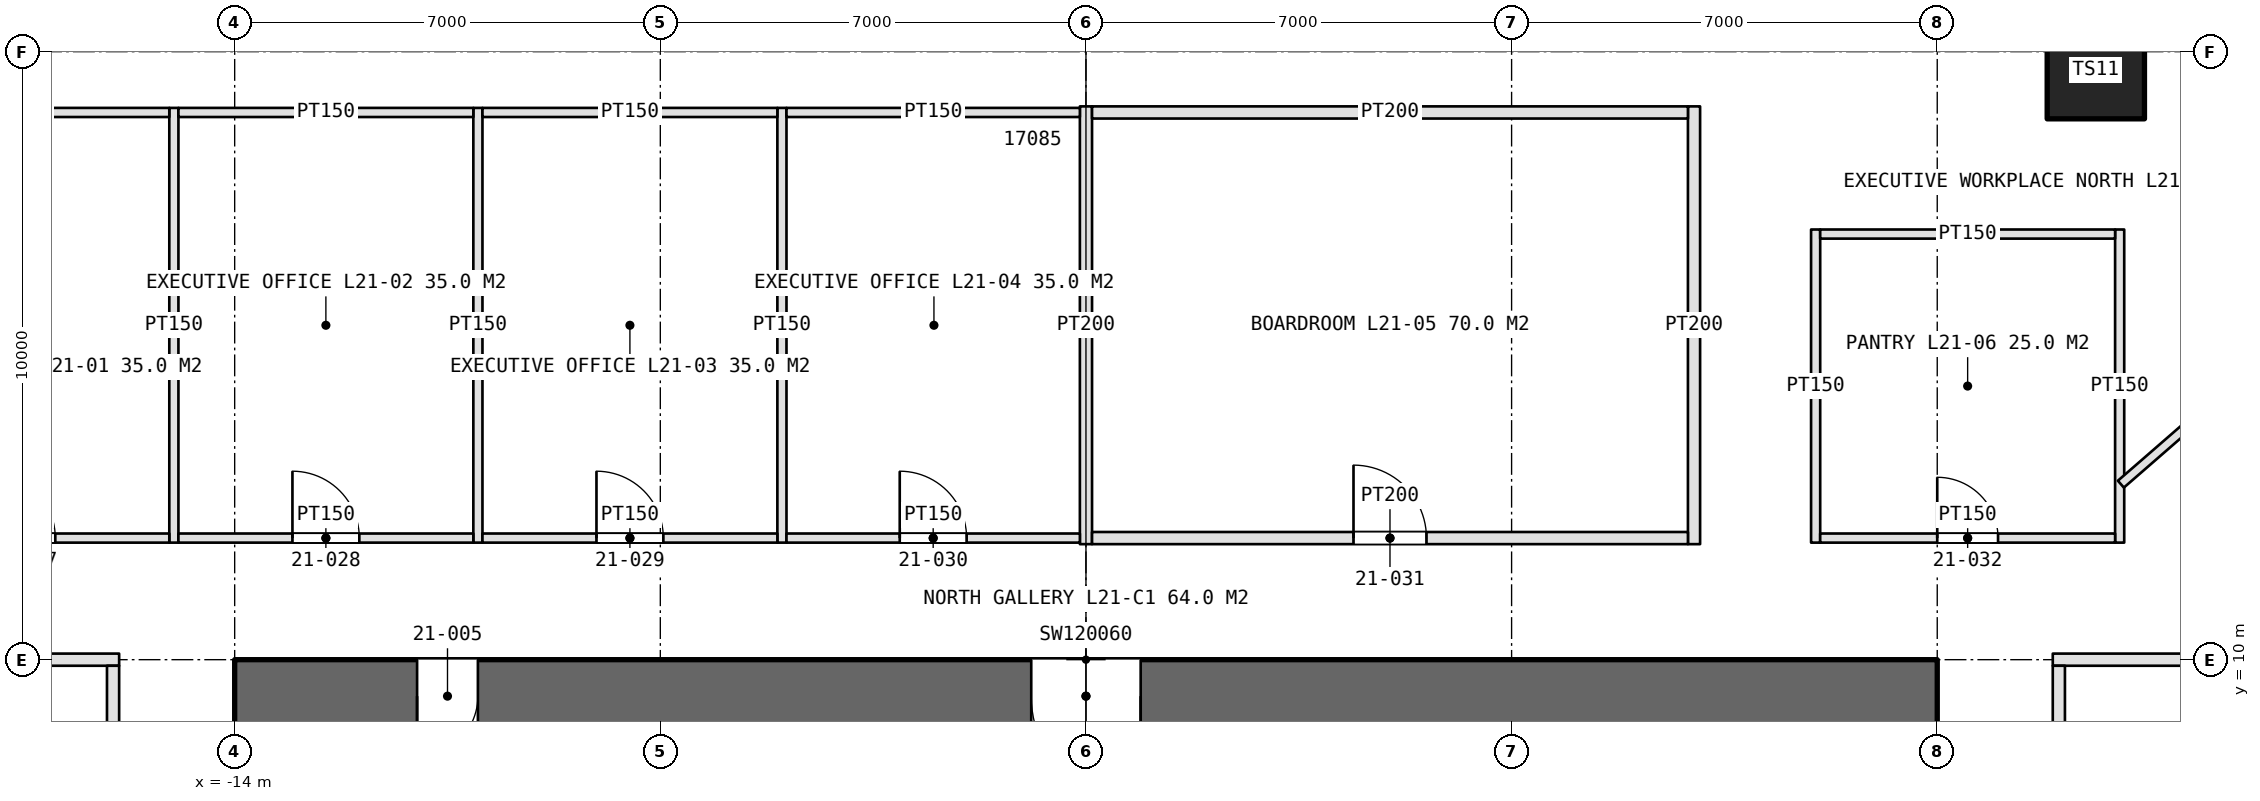
"""IFC4 building model, lengths in metres.
Left out: names, types, materials, properties, quantities, classifications, styles, units other than length and angle.
Written with IfcOpenShell. Run it as: python <this file> out.ifc"""

import sys

from ifc_helpers import new_model, si_unit, direction, frame, frame_2d, origin, origin_2d, place, context, subcontext, project, spatial, rectangle, hollow_rectangle, extrude, element, fill, save


model = new_model("IFC4")
c1 = context("Model", 3, precision=1e-05, world=origin(), true_north=direction((0.0, 1.0)))
c2 = subcontext(c1, "Body", "Model", "MODEL_VIEW")
j1 = project(units=[si_unit("LENGTHUNIT", "METRE"), si_unit("PLANEANGLEUNIT", "RADIAN")], contexts=[c1])
p1 = place(None, origin())
s1 = spatial("IfcSite", under=j1, at=p1, CompositionType="ELEMENT")
p2 = place(p1, origin())
s2 = spatial("IfcBuilding", under=s1, at=p2, CompositionType="ELEMENT")
p3 = place(p2, frame((0.0, 0.0, 105.0)))
s3 = spatial("IfcBuildingStorey", under=s2, at=p3, CompositionType="ELEMENT", Elevation=105.0)
p4 = place(p3, frame((14.0, 9.4, 0.0), z_axis=(0.0, 0.0, 1.0), x_axis=(-1.0, 0.0, 0.0)))
e1 = element("IfcWall", 1, at=p4, inside=s3, PredefinedType="SHEAR", context=c2, shape_type="SweptSolid", body=[
    extrude(rectangle(XDim=28.0, YDim=1.2, at=frame_2d((14.0, 0.0))), origin(), (0.0, 0.0, 1.0), 4.2),
])
p5 = place(p4, frame((24.0, 0.0, 0.0)))
e2 = element("IfcOpeningElement", 2, at=p5, cuts=e1, PredefinedType="OPENING", context=c2, shape_type="SweptSolid", body=[
    extrude(rectangle(XDim=1.0, YDim=2.4, at=frame_2d((0.5, 1.2))), frame((0.0, 0.61, 0.0), z_axis=(0.0, -1.0, 0.0), x_axis=(1.0, 0.0, 0.0)), (0.0, 0.0, 1.0), 1.22),
])
p6 = place(p4, frame((13.1, 0.0, 0.0)))
e3 = element("IfcOpeningElement", 3, at=p6, cuts=e1, PredefinedType="OPENING", context=c2, shape_type="SweptSolid", body=[
    extrude(rectangle(XDim=1.8, YDim=2.4, at=frame_2d((0.9, 1.2))), frame((0.0, 0.61, 0.0), z_axis=(0.0, -1.0, 0.0), x_axis=(1.0, 0.0, 0.0)), (0.0, 0.0, 1.0), 1.22),
])
p7 = place(p3, frame((16.608, 19.695, 0.0), z_axis=(0.0, 0.0, 1.0), x_axis=(1.0, 0.0, 0.0)))
e4 = element("IfcColumn", 4, at=p7, inside=s3, PredefinedType="COLUMN", context=c2, shape_type="SweptSolid", body=[
    extrude(hollow_rectangle(XDim=1.6, YDim=1.6, WallThickness=0.15, at=origin_2d()), origin(), (0.0, 0.0, 1.0), 4.2),
])
for number, where, z_axis, x_axis in (
    (5, (-15.0, 11.925, 0.0), (0.0, 0.0, 1.0), (0.0, 1.0, 0.0)),
    (6, (-10.0, 11.925, 0.0), (0.0, 0.0, 1.0), (0.0, 1.0, 0.0)),
    (7, (-5.0, 11.925, 0.0), (0.0, 0.0, 1.0), (0.0, 1.0, 0.0)),
):
    element("IfcWall", number, at=place(p3, frame(where, z_axis=z_axis, x_axis=x_axis)), inside=s3, PredefinedType="PARTITIONING", context=c2, shape_type="SweptSolid", body=[
        extrude(rectangle(XDim=7.15, YDim=0.15, at=frame_2d((3.575, 0.0))), origin(), (0.0, 0.0, 1.0), 3.0),
    ])
for number, where, z_axis, x_axis in (
    (8, (0.0, 11.9, 0.0), (0.0, 0.0, 1.0), (0.0, 1.0, 0.0)),
    (9, (10.0, 11.9, 0.0), (0.0, 0.0, 1.0), (0.0, 1.0, 0.0)),
):
    element("IfcWall", number, at=place(p3, frame(where, z_axis=z_axis, x_axis=x_axis)), inside=s3, PredefinedType="PARTITIONING", context=c2, shape_type="SweptSolid", body=[
        extrude(rectangle(XDim=7.2, YDim=0.2, at=frame_2d((3.6, 0.0))), origin(), (0.0, 0.0, 1.0), 3.0),
    ])
p8 = place(p3, frame((-19.925, 12.0, 0.0), z_axis=(0.0, 0.0, 1.0), x_axis=(1.0, 0.0, 0.0)))
e10 = element("IfcWall", 10, at=p8, inside=s3, PredefinedType="PARTITIONING", context=c2, shape_type="SweptSolid", body=[
    extrude(rectangle(XDim=4.85, YDim=0.15, at=frame_2d((2.425, 0.0))), origin(), (0.0, 0.0, 1.0), 3.0),
])
p9 = place(p8, frame((1.875, 0.0, 0.0)))
e11 = element("IfcOpeningElement", 11, at=p9, cuts=e10, PredefinedType="OPENING", context=c2, shape_type="SweptSolid", body=[
    extrude(rectangle(XDim=1.1, YDim=2.3, at=frame_2d((0.55, 1.15))), frame((0.0, 0.085, 0.0), z_axis=(0.0, -1.0, 0.0), x_axis=(1.0, 0.0, 0.0)), (0.0, 0.0, 1.0), 0.17),
])
p10 = place(p3, frame((-19.925, 19.0, 0.0), z_axis=(0.0, 0.0, 1.0), x_axis=(1.0, 0.0, 0.0)))
e12 = element("IfcWall", 12, at=p10, inside=s3, PredefinedType="PARTITIONING", context=c2, shape_type="SweptSolid", body=[
    extrude(rectangle(XDim=4.85, YDim=0.15, at=frame_2d((2.425, 0.0))), origin(), (0.0, 0.0, 1.0), 3.0),
])
p11 = place(p3, frame((-14.925, 12.0, 0.0), z_axis=(0.0, 0.0, 1.0), x_axis=(1.0, 0.0, 0.0)))
e13 = element("IfcWall", 13, at=p11, inside=s3, PredefinedType="PARTITIONING", context=c2, shape_type="SweptSolid", body=[
    extrude(rectangle(XDim=4.85, YDim=0.15, at=frame_2d((2.425, 0.0))), origin(), (0.0, 0.0, 1.0), 3.0),
])
p12 = place(p11, frame((1.875, 0.0, 0.0)))
e14 = element("IfcOpeningElement", 14, at=p12, cuts=e13, PredefinedType="OPENING", context=c2, shape_type="SweptSolid", body=[
    extrude(rectangle(XDim=1.1, YDim=2.3, at=frame_2d((0.55, 1.15))), frame((0.0, 0.085, 0.0), z_axis=(0.0, -1.0, 0.0), x_axis=(1.0, 0.0, 0.0)), (0.0, 0.0, 1.0), 0.17),
])
p13 = place(p3, frame((-14.925, 19.0, 0.0), z_axis=(0.0, 0.0, 1.0), x_axis=(1.0, 0.0, 0.0)))
e15 = element("IfcWall", 15, at=p13, inside=s3, PredefinedType="PARTITIONING", context=c2, shape_type="SweptSolid", body=[
    extrude(rectangle(XDim=4.85, YDim=0.15, at=frame_2d((2.425, 0.0))), origin(), (0.0, 0.0, 1.0), 3.0),
])
p14 = place(p3, frame((-9.925, 12.0, 0.0), z_axis=(0.0, 0.0, 1.0), x_axis=(1.0, 0.0, 0.0)))
e16 = element("IfcWall", 16, at=p14, inside=s3, PredefinedType="PARTITIONING", context=c2, shape_type="SweptSolid", body=[
    extrude(rectangle(XDim=4.85, YDim=0.15, at=frame_2d((2.425, 0.0))), origin(), (0.0, 0.0, 1.0), 3.0),
])
p15 = place(p14, frame((1.875, 0.0, 0.0)))
e17 = element("IfcOpeningElement", 17, at=p15, cuts=e16, PredefinedType="OPENING", context=c2, shape_type="SweptSolid", body=[
    extrude(rectangle(XDim=1.1, YDim=2.3, at=frame_2d((0.55, 1.15))), frame((0.0, 0.085, 0.0), z_axis=(0.0, -1.0, 0.0), x_axis=(1.0, 0.0, 0.0)), (0.0, 0.0, 1.0), 0.17),
])
p16 = place(p3, frame((-9.925, 19.0, 0.0), z_axis=(0.0, 0.0, 1.0), x_axis=(1.0, 0.0, 0.0)))
e18 = element("IfcWall", 18, at=p16, inside=s3, PredefinedType="PARTITIONING", context=c2, shape_type="SweptSolid", body=[
    extrude(rectangle(XDim=4.85, YDim=0.15, at=frame_2d((2.425, 0.0))), origin(), (0.0, 0.0, 1.0), 3.0),
])
p17 = place(p3, frame((-4.925, 12.0, 0.0), z_axis=(0.0, 0.0, 1.0), x_axis=(1.0, 0.0, 0.0)))
e19 = element("IfcWall", 19, at=p17, inside=s3, PredefinedType="PARTITIONING", context=c2, shape_type="SweptSolid", body=[
    extrude(rectangle(XDim=4.825, YDim=0.15, at=frame_2d((2.413, 0.0))), origin(), (0.0, 0.0, 1.0), 3.0),
])
p18 = place(p17, frame((1.863, 0.0, 0.0)))
e20 = element("IfcOpeningElement", 20, at=p18, cuts=e19, PredefinedType="OPENING", context=c2, shape_type="SweptSolid", body=[
    extrude(rectangle(XDim=1.1, YDim=2.3, at=frame_2d((0.55, 1.15))), frame((0.0, 0.085, 0.0), z_axis=(0.0, -1.0, 0.0), x_axis=(1.0, 0.0, 0.0)), (0.0, 0.0, 1.0), 0.17),
])
p19 = place(p3, frame((-4.925, 19.0, 0.0), z_axis=(0.0, 0.0, 1.0), x_axis=(1.0, 0.0, 0.0)))
e21 = element("IfcWall", 21, at=p19, inside=s3, PredefinedType="PARTITIONING", context=c2, shape_type="SweptSolid", body=[
    extrude(rectangle(XDim=4.825, YDim=0.15, at=frame_2d((2.413, 0.0))), origin(), (0.0, 0.0, 1.0), 3.0),
])
p20 = place(p3, frame((0.1, 12.0, 0.0), z_axis=(0.0, 0.0, 1.0), x_axis=(1.0, 0.0, 0.0)))
e22 = element("IfcWall", 22, at=p20, inside=s3, PredefinedType="PARTITIONING", context=c2, shape_type="SweptSolid", body=[
    extrude(rectangle(XDim=9.8, YDim=0.2, at=frame_2d((4.9, 0.0))), origin(), (0.0, 0.0, 1.0), 3.0),
])
p21 = place(p20, frame((4.3, 0.0, 0.0)))
e23 = element("IfcOpeningElement", 23, at=p21, cuts=e22, PredefinedType="OPENING", context=c2, shape_type="SweptSolid", body=[
    extrude(rectangle(XDim=1.2, YDim=2.4, at=frame_2d((0.6, 1.2))), frame((0.0, 0.11, 0.0), z_axis=(0.0, -1.0, 0.0), x_axis=(1.0, 0.0, 0.0)), (0.0, 0.0, 1.0), 0.22),
])
p22 = place(p3, frame((0.1, 19.0, 0.0), z_axis=(0.0, 0.0, 1.0), x_axis=(1.0, 0.0, 0.0)))
e24 = element("IfcWall", 24, at=p22, inside=s3, PredefinedType="PARTITIONING", context=c2, shape_type="SweptSolid", body=[
    extrude(rectangle(XDim=9.8, YDim=0.2, at=frame_2d((4.9, 0.0))), origin(), (0.0, 0.0, 1.0), 3.0),
])
for number, where, z_axis, x_axis in (
    (25, (12.0, 11.925, 0.0), (0.0, 0.0, 1.0), (0.0, 1.0, 0.0)),
    (26, (17.0, 11.925, 0.0), (0.0, 0.0, 1.0), (0.0, 1.0, 0.0)),
):
    element("IfcWall", number, at=place(p3, frame(where, z_axis=z_axis, x_axis=x_axis)), inside=s3, PredefinedType="PARTITIONING", context=c2, shape_type="SweptSolid", body=[
        extrude(rectangle(XDim=5.15, YDim=0.15, at=frame_2d((2.575, 0.0))), origin(), (0.0, 0.0, 1.0), 3.0),
    ])
p23 = place(p3, frame((12.075, 12.0, 0.0), z_axis=(0.0, 0.0, 1.0), x_axis=(1.0, 0.0, 0.0)))
e27 = element("IfcWall", 27, at=p23, inside=s3, PredefinedType="PARTITIONING", context=c2, shape_type="SweptSolid", body=[
    extrude(rectangle(XDim=4.85, YDim=0.15, at=frame_2d((2.425, 0.0))), origin(), (0.0, 0.0, 1.0), 3.0),
])
p24 = place(p23, frame((1.925, 0.0, 0.0)))
e28 = element("IfcOpeningElement", 28, at=p24, cuts=e27, PredefinedType="OPENING", context=c2, shape_type="SweptSolid", body=[
    extrude(rectangle(XDim=1.0, YDim=2.2, at=frame_2d((0.5, 1.1))), frame((0.0, 0.085, 0.0), z_axis=(0.0, -1.0, 0.0), x_axis=(1.0, 0.0, 0.0)), (0.0, 0.0, 1.0), 0.17),
])
p25 = place(p3, frame((12.075, 17.0, 0.0), z_axis=(0.0, 0.0, 1.0), x_axis=(1.0, 0.0, 0.0)))
e29 = element("IfcWall", 29, at=p25, inside=s3, PredefinedType="PARTITIONING", context=c2, shape_type="SweptSolid", body=[
    extrude(rectangle(XDim=4.85, YDim=0.15, at=frame_2d((2.425, 0.0))), origin(), (0.0, 0.0, 1.0), 3.0),
])
p26 = place(p3, frame((15.9, 10.0, 0.0), z_axis=(0.0, 0.0, 1.0), x_axis=(1.0, 0.0, 0.0)))
e30 = element("IfcWall", 30, at=p26, inside=s3, PredefinedType="PARTITIONING", context=c2, shape_type="SweptSolid", body=[
    extrude(rectangle(XDim=7.2, YDim=0.2, at=frame_2d((3.6, 0.0))), origin(), (0.0, 0.0, 1.0), 3.0),
])
p27 = place(p3, frame((16.0, 5.1, 0.0), z_axis=(0.0, 0.0, 1.0), x_axis=(0.0, 1.0, 0.0)))
e31 = element("IfcWall", 31, at=p27, inside=s3, PredefinedType="PARTITIONING", context=c2, shape_type="SweptSolid", body=[
    extrude(rectangle(XDim=4.8, YDim=0.2, at=frame_2d((2.4, 0.0))), origin(), (0.0, 0.0, 1.0), 3.0),
])
p28 = place(p27, frame((1.8, 0.0, 0.0)))
e32 = element("IfcOpeningElement", 32, at=p28, cuts=e31, PredefinedType="OPENING", context=c2, shape_type="SweptSolid", body=[
    extrude(rectangle(XDim=1.2, YDim=2.4, at=frame_2d((0.6, 1.2))), frame((0.0, 0.11, 0.0), z_axis=(0.0, -1.0, 0.0), x_axis=(1.0, 0.0, 0.0)), (0.0, 0.0, 1.0), 0.22),
])
p29 = place(p3, frame((-15.9, 10.0, 0.0), z_axis=(0.0, 0.0, 1.0), x_axis=(-1.0, 0.0, 0.0)))
e33 = element("IfcWall", 33, at=p29, inside=s3, PredefinedType="PARTITIONING", context=c2, shape_type="SweptSolid", body=[
    extrude(rectangle(XDim=5.2, YDim=0.2, at=frame_2d((2.6, 0.0))), origin(), (0.0, 0.0, 1.0), 3.0),
])
p30 = place(p3, frame((-16.0, 5.1, 0.0), z_axis=(0.0, 0.0, 1.0), x_axis=(0.0, 1.0, 0.0)))
e34 = element("IfcWall", 34, at=p30, inside=s3, PredefinedType="PARTITIONING", context=c2, shape_type="SweptSolid", body=[
    extrude(rectangle(XDim=4.8, YDim=0.2, at=frame_2d((2.4, 0.0))), origin(), (0.0, 0.0, 1.0), 3.0),
])
p31 = place(p30, frame((1.85, 0.0, 0.0)))
e35 = element("IfcOpeningElement", 35, at=p31, cuts=e34, PredefinedType="OPENING", context=c2, shape_type="SweptSolid", body=[
    extrude(rectangle(XDim=1.1, YDim=2.3, at=frame_2d((0.55, 1.15))), frame((0.0, 0.11, 0.0), z_axis=(0.0, -1.0, 0.0), x_axis=(1.0, 0.0, 0.0)), (0.0, 0.0, 1.0), 0.22),
])
p32 = place(p3, frame((17.02, 12.887, 0.0), z_axis=(0.0, 0.0, 1.0), x_axis=(0.75468613342, 0.656086000479, 0.0)))
e36 = element("IfcWall", 36, at=p32, inside=s3, PredefinedType="PARTITIONING", context=c2, shape_type="SweptSolid", body=[
    extrude(rectangle(XDim=8.867, YDim=0.15, at=frame_2d((4.433, 0.0))), origin(), (0.0, 0.0, 1.0), 3.0),
])
p33 = place(p5, origin())
e37 = element("IfcDoor", 37, at=p33, inside=s3, OperationType="SINGLE_SWING_RIGHT", PredefinedType="DOOR", context=c2, shape_type="SweptSolid", body=[
    extrude(rectangle(XDim=1.0, YDim=2.4, at=frame_2d((0.5, 1.2))), frame((0.0, 0.025, 0.0), z_axis=(0.0, -1.0, 0.0), x_axis=(1.0, 0.0, 0.0)), (0.0, 0.0, 1.0), 0.05),
])
fill(e2, e37)
p34 = place(p6, origin())
e38 = element("IfcDoor", 38, at=p34, inside=s3, OperationType="DOUBLE_DOOR_SINGLE_SWING", PredefinedType="DOOR", context=c2, shape_type="SweptSolid", body=[
    extrude(rectangle(XDim=1.8, YDim=2.4, at=frame_2d((0.9, 1.2))), frame((0.0, 0.025, 0.0), z_axis=(0.0, -1.0, 0.0), x_axis=(1.0, 0.0, 0.0)), (0.0, 0.0, 1.0), 0.05),
])
fill(e3, e38)
p35 = place(p9, origin())
e39 = element("IfcDoor", 39, at=p35, inside=s3, OperationType="SINGLE_SWING_LEFT", PredefinedType="DOOR", context=c2, shape_type="SweptSolid", body=[
    extrude(rectangle(XDim=1.1, YDim=2.3, at=frame_2d((0.55, 1.15))), frame((0.0, 0.025, 0.0), z_axis=(0.0, -1.0, 0.0), x_axis=(1.0, 0.0, 0.0)), (0.0, 0.0, 1.0), 0.05),
])
fill(e11, e39)
p36 = place(p12, origin())
e40 = element("IfcDoor", 40, at=p36, inside=s3, OperationType="SINGLE_SWING_LEFT", PredefinedType="DOOR", context=c2, shape_type="SweptSolid", body=[
    extrude(rectangle(XDim=1.1, YDim=2.3, at=frame_2d((0.55, 1.15))), frame((0.0, 0.025, 0.0), z_axis=(0.0, -1.0, 0.0), x_axis=(1.0, 0.0, 0.0)), (0.0, 0.0, 1.0), 0.05),
])
fill(e14, e40)
p37 = place(p15, origin())
e41 = element("IfcDoor", 41, at=p37, inside=s3, OperationType="SINGLE_SWING_LEFT", PredefinedType="DOOR", context=c2, shape_type="SweptSolid", body=[
    extrude(rectangle(XDim=1.1, YDim=2.3, at=frame_2d((0.55, 1.15))), frame((0.0, 0.025, 0.0), z_axis=(0.0, -1.0, 0.0), x_axis=(1.0, 0.0, 0.0)), (0.0, 0.0, 1.0), 0.05),
])
fill(e17, e41)
p38 = place(p18, origin())
e42 = element("IfcDoor", 42, at=p38, inside=s3, OperationType="SINGLE_SWING_LEFT", PredefinedType="DOOR", context=c2, shape_type="SweptSolid", body=[
    extrude(rectangle(XDim=1.1, YDim=2.3, at=frame_2d((0.55, 1.15))), frame((0.0, 0.025, 0.0), z_axis=(0.0, -1.0, 0.0), x_axis=(1.0, 0.0, 0.0)), (0.0, 0.0, 1.0), 0.05),
])
fill(e20, e42)
p39 = place(p21, origin())
e43 = element("IfcDoor", 43, at=p39, inside=s3, OperationType="SINGLE_SWING_LEFT", PredefinedType="DOOR", context=c2, shape_type="SweptSolid", body=[
    extrude(rectangle(XDim=1.2, YDim=2.4, at=frame_2d((0.6, 1.2))), frame((0.0, 0.025, 0.0), z_axis=(0.0, -1.0, 0.0), x_axis=(1.0, 0.0, 0.0)), (0.0, 0.0, 1.0), 0.05),
])
fill(e23, e43)
p40 = place(p24, origin())
e44 = element("IfcDoor", 44, at=p40, inside=s3, OperationType="SINGLE_SWING_LEFT", PredefinedType="DOOR", context=c2, shape_type="SweptSolid", body=[
    extrude(rectangle(XDim=1.0, YDim=2.2, at=frame_2d((0.5, 1.1))), frame((0.0, 0.025, 0.0), z_axis=(0.0, -1.0, 0.0), x_axis=(1.0, 0.0, 0.0)), (0.0, 0.0, 1.0), 0.05),
])
fill(e28, e44)
save(model, sys.argv[1])
